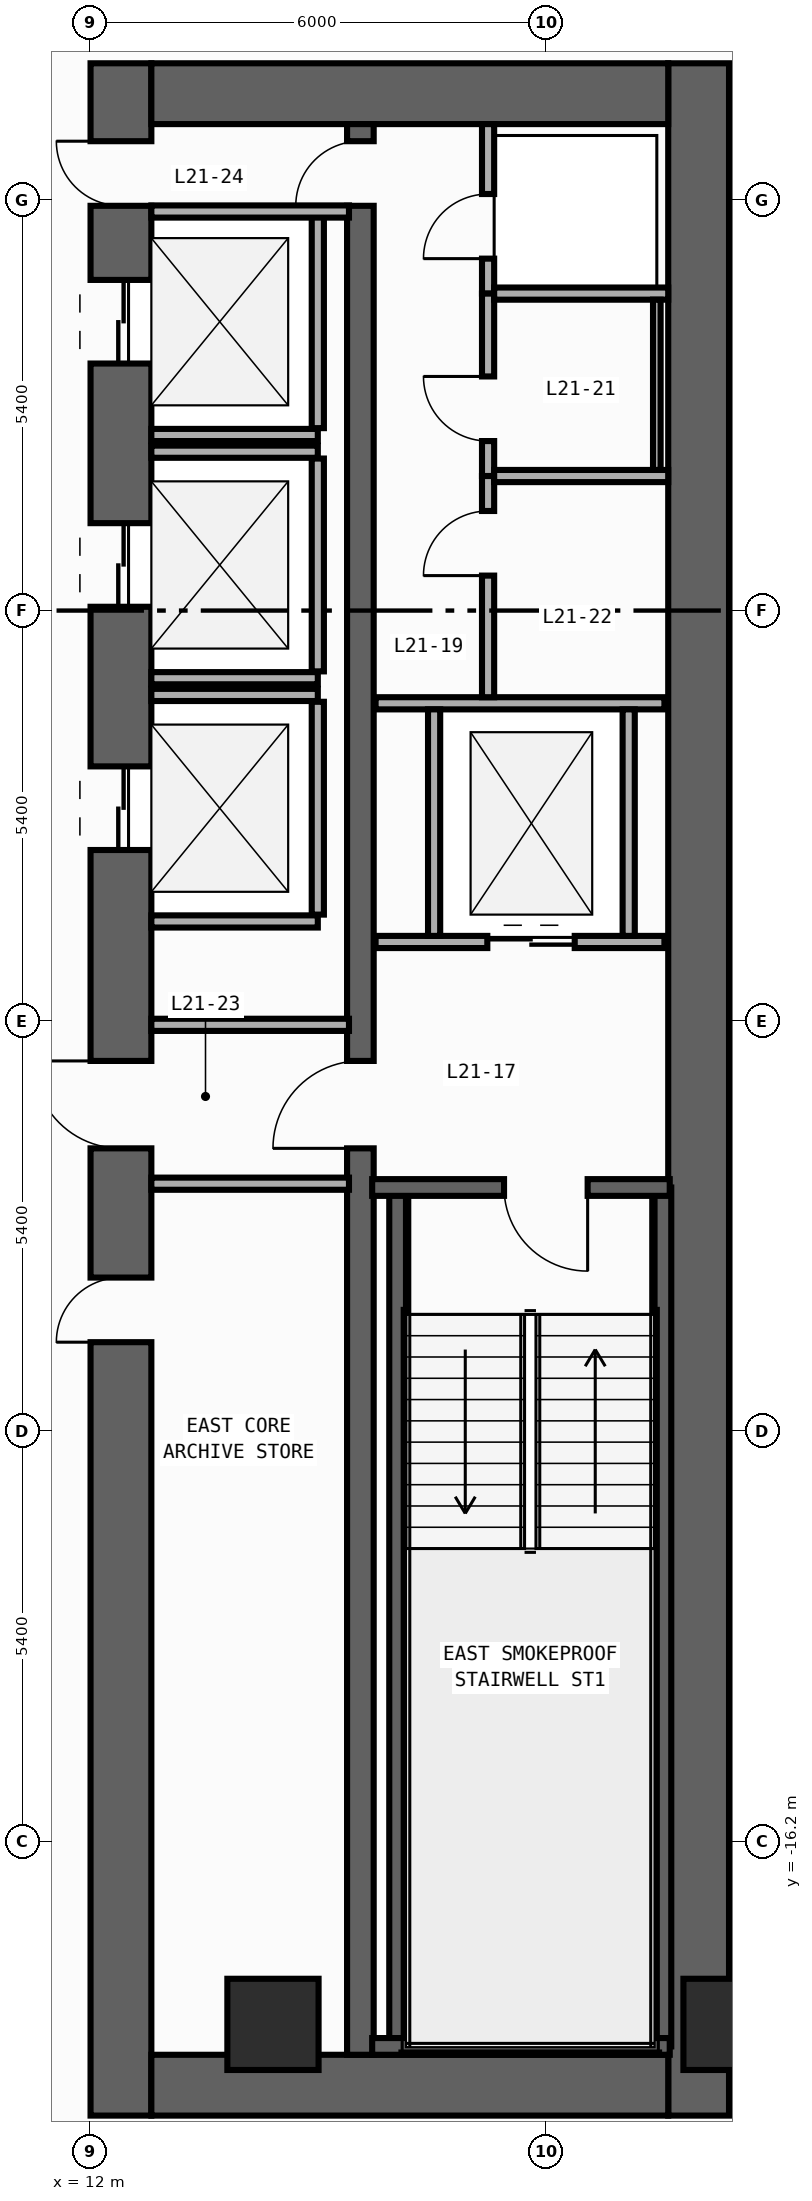
"""IFC4 building model, lengths in metres.
Left out: names, types, materials, properties, quantities, classifications, styles, units other than length and angle.
Written with IfcOpenShell. Run it as: python <this file> out.ifc"""

import sys

from ifc_helpers import new_model, si_unit, direction, frame, frame_2d, origin, origin_2d, place, context, subcontext, project, spatial, rectangle, extrude, element, fill, save


model = new_model("IFC4")
c1 = context("Model", 3, precision=1e-05, world=origin(), true_north=direction((0.0, 1.0)))
c2 = subcontext(c1, "Body", "Model", "MODEL_VIEW")
j1 = project(units=[si_unit("LENGTHUNIT", "METRE"), si_unit("PLANEANGLEUNIT", "RADIAN")], contexts=[c1])
p1 = place(None, origin())
s1 = spatial("IfcSite", under=j1, at=p1, CompositionType="ELEMENT")
p2 = place(p1, origin())
s2 = spatial("IfcBuilding", under=s1, at=p2, CompositionType="ELEMENT")
p3 = place(p2, frame((0.0, 0.0, 93.2)))
s3 = spatial("IfcBuildingStorey", under=s2, at=p3, CompositionType="ELEMENT", Elevation=93.2)
p4 = place(p3, frame((12.4, -19.8, 0.0), z_axis=(0.0, 0.0, 1.0), x_axis=(0.0, 1.0, 0.0)))
e1 = element("IfcWall", 1, at=p4, inside=s3, PredefinedType="SHEAR", context=c2, shape_type="SweptSolid", body=[
    extrude(rectangle(XDim=27.0, YDim=0.8, at=frame_2d((13.5, 0.0))), origin(), (0.0, 0.0, 1.0), 3.94),
])
p5 = place(p4, frame((23.05, 0.0, 0.0)))
e2 = element("IfcOpeningElement", 2, at=p5, cuts=e1, PredefinedType="OPENING", context=c2, shape_type="SweptSolid", body=[
    extrude(rectangle(XDim=1.1, YDim=2.2, at=frame_2d((0.55, 1.1))), frame((0.0, 0.41, 0.0), z_axis=(0.0, -1.0, 0.0), x_axis=(1.0, 0.0, 0.0)), (0.0, 0.0, 1.0), 0.82),
])
p6 = place(p4, frame((19.85, 0.0, 0.0)))
e3 = element("IfcOpeningElement", 3, at=p6, cuts=e1, PredefinedType="OPENING", context=c2, shape_type="SweptSolid", body=[
    extrude(rectangle(XDim=1.1, YDim=2.2, at=frame_2d((0.55, 1.1))), frame((0.0, 0.41, 0.0), z_axis=(0.0, -1.0, 0.0), x_axis=(1.0, 0.0, 0.0)), (0.0, 0.0, 1.0), 0.82),
])
p7 = place(p4, frame((16.65, 0.0, 0.0)))
e4 = element("IfcOpeningElement", 4, at=p7, cuts=e1, PredefinedType="OPENING", context=c2, shape_type="SweptSolid", body=[
    extrude(rectangle(XDim=1.1, YDim=2.2, at=frame_2d((0.55, 1.1))), frame((0.0, 0.41, 0.0), z_axis=(0.0, -1.0, 0.0), x_axis=(1.0, 0.0, 0.0)), (0.0, 0.0, 1.0), 0.82),
])
p8 = place(p4, frame((10.175, 0.0, 0.0)))
e5 = element("IfcOpeningElement", 5, at=p8, cuts=e1, PredefinedType="OPENING", context=c2, shape_type="SweptSolid", body=[
    extrude(rectangle(XDim=0.85, YDim=2.1, at=frame_2d((0.425, 1.05))), frame((0.0, 0.41, 0.0), z_axis=(0.0, -1.0, 0.0), x_axis=(1.0, 0.0, 0.0)), (0.0, 0.0, 1.0), 0.82),
])
p9 = place(p4, frame((12.725, 0.0, 0.0)))
e6 = element("IfcOpeningElement", 6, at=p9, cuts=e1, PredefinedType="OPENING", context=c2, shape_type="SweptSolid", body=[
    extrude(rectangle(XDim=1.15, YDim=2.2, at=frame_2d((0.575, 1.1))), frame((0.0, 0.41, 0.0), z_axis=(0.0, -1.0, 0.0), x_axis=(1.0, 0.0, 0.0)), (0.0, 0.0, 1.0), 0.82),
])
p10 = place(p4, frame((25.125, 0.0, 0.0)))
e7 = element("IfcOpeningElement", 7, at=p10, cuts=e1, PredefinedType="OPENING", context=c2, shape_type="SweptSolid", body=[
    extrude(rectangle(XDim=0.85, YDim=2.1, at=frame_2d((0.425, 1.05))), frame((0.0, 0.41, 0.0), z_axis=(0.0, -1.0, 0.0), x_axis=(1.0, 0.0, 0.0)), (0.0, 0.0, 1.0), 0.82),
])
p11 = place(p3, frame((20.0, -19.8, 0.0), z_axis=(0.0, 0.0, 1.0), x_axis=(0.0, 1.0, 0.0)))
e8 = element("IfcWall", 8, at=p11, inside=s3, PredefinedType="SHEAR", context=c2, shape_type="SweptSolid", body=[
    extrude(rectangle(XDim=27.0, YDim=0.8, at=frame_2d((13.5, 0.0))), origin(), (0.0, 0.0, 1.0), 3.94),
])
for number, where, z_axis, x_axis in (
    (9, (12.8, -19.4, 0.0), (0.0, 0.0, 1.0), (1.0, 0.0, 0.0)),
    (10, (12.8, 6.8, 0.0), (0.0, 0.0, 1.0), (1.0, 0.0, 0.0)),
):
    element("IfcWall", number, at=place(p3, frame(where, z_axis=z_axis, x_axis=x_axis)), inside=s3, PredefinedType="SHEAR", context=c2, shape_type="SweptSolid", body=[
        extrude(rectangle(XDim=6.8, YDim=0.8, at=frame_2d((3.4, 0.0))), origin(), (0.0, 0.0, 1.0), 3.94),
    ])
p12 = place(p3, frame((15.55, -19.0, 0.0), z_axis=(0.0, 0.0, 1.0), x_axis=(0.0, 1.0, 0.0)))
e11 = element("IfcWall", 11, at=p12, inside=s3, PredefinedType="SHEAR", context=c2, shape_type="SweptSolid", body=[
    extrude(rectangle(XDim=25.4, YDim=0.35, at=frame_2d((12.7, 0.0))), origin(), (0.0, 0.0, 1.0), 3.94),
])
p13 = place(p12, frame((11.925, 0.0, 0.0)))
e12 = element("IfcOpeningElement", 12, at=p13, cuts=e11, PredefinedType="OPENING", context=c2, shape_type="SweptSolid", body=[
    extrude(rectangle(XDim=1.15, YDim=2.2, at=frame_2d((0.575, 1.1))), frame((0.0, 0.185, 0.0), z_axis=(0.0, -1.0, 0.0), x_axis=(1.0, 0.0, 0.0)), (0.0, 0.0, 1.0), 0.37),
])
p14 = place(p12, frame((24.325, 0.0, 0.0)))
e13 = element("IfcOpeningElement", 13, at=p14, cuts=e11, PredefinedType="OPENING", context=c2, shape_type="SweptSolid", body=[
    extrude(rectangle(XDim=0.85, YDim=2.1, at=frame_2d((0.425, 1.05))), frame((0.0, 0.185, 0.0), z_axis=(0.0, -1.0, 0.0), x_axis=(1.0, 0.0, 0.0)), (0.0, 0.0, 1.0), 0.37),
])
for number, where, z_axis, x_axis in (
    (14, (16.04, -18.89, 0.0), (0.0, 0.0, 1.0), (0.0, 1.0, 0.0)),
    (15, (19.53, -18.89, 0.0), (0.0, 0.0, 1.0), (0.0, 1.0, 0.0)),
):
    element("IfcWall", number, at=place(p3, frame(where, z_axis=z_axis, x_axis=x_axis)), inside=s3, PredefinedType="SHEAR", context=c2, shape_type="SweptSolid", body=[
        extrude(rectangle(XDim=11.3, YDim=0.22, at=frame_2d((5.65, 0.0))), origin(), (0.0, 0.0, 1.0), 3.94),
    ])
p15 = place(p3, frame((15.705, -18.89, 0.0), z_axis=(0.0, 0.0, 1.0), x_axis=(1.0, 0.0, 0.0)))
e16 = element("IfcWall", 16, at=p15, inside=s3, PredefinedType="SHEAR", context=c2, shape_type="SweptSolid", body=[
    extrude(rectangle(XDim=3.915, YDim=0.22, at=frame_2d((1.958, 0.0))), origin(), (0.0, 0.0, 1.0), 3.94),
])
p16 = place(p3, frame((19.62, -7.59, 0.0), z_axis=(0.0, 0.0, 1.0), x_axis=(-1.0, 0.0, 0.0)))
e17 = element("IfcWall", 17, at=p16, inside=s3, PredefinedType="SHEAR", context=c2, shape_type="SweptSolid", body=[
    extrude(rectangle(XDim=3.915, YDim=0.22, at=frame_2d((1.958, 0.0))), origin(), (0.0, 0.0, 1.0), 3.94),
])
p17 = place(p16, frame((1.08, 0.0, 0.0)))
e18 = element("IfcOpeningElement", 18, at=p17, cuts=e17, PredefinedType="OPENING", context=c2, shape_type="SweptSolid", body=[
    extrude(rectangle(XDim=1.1, YDim=2.2, at=frame_2d((0.55, 1.1))), frame((0.0, 0.12, 0.0), z_axis=(0.0, -1.0, 0.0), x_axis=(1.0, 0.0, 0.0)), (0.0, 0.0, 1.0), 0.24),
])
for number, where, z_axis, x_axis in (
    (19, (20.4, -18.6, 0.0), (0.0, 0.0, 1.0), (1.0, 0.0, 0.0)),
    (20, (14.4, -18.6, 0.0), (0.0, 0.0, 1.0), (1.0, 0.0, 0.0)),
):
    element("IfcColumn", number, at=place(p3, frame(where, z_axis=z_axis, x_axis=x_axis)), inside=s3, PredefinedType="COLUMN", context=c2, shape_type="SweptSolid", body=[
        extrude(rectangle(XDim=1.2, YDim=1.2, at=origin_2d()), origin(), (0.0, 0.0, 1.0), 4.2),
    ])
p18 = place(p3, frame((12.8, 2.31, 0.0), z_axis=(0.0, 0.0, 1.0), x_axis=(1.0, 0.0, 0.0)))
e21 = element("IfcWall", 21, at=p18, inside=s3, PredefinedType="STANDARD", context=c2, shape_type="SweptSolid", body=[
    extrude(rectangle(XDim=2.19, YDim=0.16, at=frame_2d((1.095, 0.0))), origin(), (0.0, 0.0, 1.0), 3.94),
])
p19 = place(p3, frame((14.99, 2.4, 0.0), z_axis=(0.0, 0.0, 1.0), x_axis=(0.0, 1.0, 0.0)))
e22 = element("IfcWall", 22, at=p19, inside=s3, PredefinedType="STANDARD", context=c2, shape_type="SweptSolid", body=[
    extrude(rectangle(XDim=2.8, YDim=0.16, at=frame_2d((1.4, 0.0))), origin(), (0.0, 0.0, 1.0), 3.94),
])
for number, where, z_axis, x_axis in (
    (23, (12.8, -0.89, 0.0), (0.0, 0.0, 1.0), (1.0, 0.0, 0.0)),
    (24, (12.8, 2.09, 0.0), (0.0, 0.0, 1.0), (1.0, 0.0, 0.0)),
):
    element("IfcWall", number, at=place(p3, frame(where, z_axis=z_axis, x_axis=x_axis)), inside=s3, PredefinedType="STANDARD", context=c2, shape_type="SweptSolid", body=[
        extrude(rectangle(XDim=2.19, YDim=0.16, at=frame_2d((1.095, 0.0))), origin(), (0.0, 0.0, 1.0), 3.94),
    ])
p20 = place(p3, frame((14.99, -0.8, 0.0), z_axis=(0.0, 0.0, 1.0), x_axis=(0.0, 1.0, 0.0)))
e25 = element("IfcWall", 25, at=p20, inside=s3, PredefinedType="STANDARD", context=c2, shape_type="SweptSolid", body=[
    extrude(rectangle(XDim=2.8, YDim=0.16, at=frame_2d((1.4, 0.0))), origin(), (0.0, 0.0, 1.0), 3.94),
])
for number, where, z_axis, x_axis in (
    (26, (12.8, -4.09, 0.0), (0.0, 0.0, 1.0), (1.0, 0.0, 0.0)),
    (27, (12.8, -1.11, 0.0), (0.0, 0.0, 1.0), (1.0, 0.0, 0.0)),
):
    element("IfcWall", number, at=place(p3, frame(where, z_axis=z_axis, x_axis=x_axis)), inside=s3, PredefinedType="STANDARD", context=c2, shape_type="SweptSolid", body=[
        extrude(rectangle(XDim=2.19, YDim=0.16, at=frame_2d((1.095, 0.0))), origin(), (0.0, 0.0, 1.0), 3.94),
    ])
p21 = place(p3, frame((14.99, -4.0, 0.0), z_axis=(0.0, 0.0, 1.0), x_axis=(0.0, 1.0, 0.0)))
e28 = element("IfcWall", 28, at=p21, inside=s3, PredefinedType="STANDARD", context=c2, shape_type="SweptSolid", body=[
    extrude(rectangle(XDim=2.8, YDim=0.16, at=frame_2d((1.4, 0.0))), origin(), (0.0, 0.0, 1.0), 3.94),
])
p22 = place(p3, frame((15.75, -4.36, 0.0), z_axis=(0.0, 0.0, 1.0), x_axis=(1.0, 0.0, 0.0)))
e29 = element("IfcWall", 29, at=p22, inside=s3, PredefinedType="STANDARD", context=c2, shape_type="SweptSolid", body=[
    extrude(rectangle(XDim=3.8, YDim=0.16, at=frame_2d((1.9, 0.0))), origin(), (0.0, 0.0, 1.0), 3.94),
])
p23 = place(p22, frame((1.47, 0.0, 0.0)))
e30 = element("IfcOpeningElement", 30, at=p23, cuts=e29, PredefinedType="OPENING", context=c2, shape_type="SweptSolid", body=[
    extrude(rectangle(XDim=1.15, YDim=2.2, at=frame_2d((0.575, 1.1))), frame((0.0, 0.09, 0.0), z_axis=(0.0, -1.0, 0.0), x_axis=(1.0, 0.0, 0.0)), (0.0, 0.0, 1.0), 0.18),
])
p24 = place(p3, frame((15.75, -1.22, 0.0), z_axis=(0.0, 0.0, 1.0), x_axis=(1.0, 0.0, 0.0)))
e31 = element("IfcWall", 31, at=p24, inside=s3, PredefinedType="STANDARD", context=c2, shape_type="SweptSolid", body=[
    extrude(rectangle(XDim=3.8, YDim=0.16, at=frame_2d((1.9, 0.0))), origin(), (0.0, 0.0, 1.0), 3.94),
])
for number, where, z_axis, x_axis in (
    (32, (16.52, -4.28, 0.0), (0.0, 0.0, 1.0), (0.0, 1.0, 0.0)),
    (33, (19.08, -4.28, 0.0), (0.0, 0.0, 1.0), (0.0, 1.0, 0.0)),
):
    element("IfcWall", number, at=place(p3, frame(where, z_axis=z_axis, x_axis=x_axis)), inside=s3, PredefinedType="STANDARD", context=c2, shape_type="SweptSolid", body=[
        extrude(rectangle(XDim=2.98, YDim=0.16, at=frame_2d((1.49, 0.0))), origin(), (0.0, 0.0, 1.0), 3.94),
    ])
for number, where, z_axis, x_axis in (
    (34, (12.8, -5.45, 0.0), (0.0, 0.0, 1.0), (1.0, 0.0, 0.0)),
    (35, (12.8, -7.54, 0.0), (0.0, 0.0, 1.0), (1.0, 0.0, 0.0)),
    (36, (12.8, 5.25, 0.0), (0.0, 0.0, 1.0), (1.0, 0.0, 0.0)),
):
    element("IfcWall", number, at=place(p3, frame(where, z_axis=z_axis, x_axis=x_axis)), inside=s3, PredefinedType="STANDARD", context=c2, shape_type="SweptSolid", body=[
        extrude(rectangle(XDim=2.6, YDim=0.16, at=frame_2d((1.3, 0.0))), origin(), (0.0, 0.0, 1.0), 3.94),
    ])
p25 = place(p3, frame((17.23, 4.17, 0.0), z_axis=(0.0, 0.0, 1.0), x_axis=(0.0, 1.0, 0.0)))
e37 = element("IfcWall", 37, at=p25, inside=s3, PredefinedType="PARTITIONING", context=c2, shape_type="SweptSolid", body=[
    extrude(rectangle(XDim=2.23, YDim=0.16, at=frame_2d((1.115, 0.0))), origin(), (0.0, 0.0, 1.0), 3.94),
])
p26 = place(p25, frame((0.46, 0.0, 0.0)))
e38 = element("IfcOpeningElement", 38, at=p26, cuts=e37, PredefinedType="OPENING", context=c2, shape_type="SweptSolid", body=[
    extrude(rectangle(XDim=0.85, YDim=2.1, at=frame_2d((0.425, 1.05))), frame((0.0, 0.09, 0.0), z_axis=(0.0, -1.0, 0.0), x_axis=(1.0, 0.0, 0.0)), (0.0, 0.0, 1.0), 0.18),
])
p27 = place(p3, frame((17.23, 1.77, 0.0), z_axis=(0.0, 0.0, 1.0), x_axis=(0.0, 1.0, 0.0)))
e39 = element("IfcWall", 39, at=p27, inside=s3, PredefinedType="PARTITIONING", context=c2, shape_type="SweptSolid", body=[
    extrude(rectangle(XDim=2.4, YDim=0.16, at=frame_2d((1.2, 0.0))), origin(), (0.0, 0.0, 1.0), 3.94),
])
p28 = place(p27, frame((0.46, 0.0, 0.0)))
e40 = element("IfcOpeningElement", 40, at=p28, cuts=e39, PredefinedType="OPENING", context=c2, shape_type="SweptSolid", body=[
    extrude(rectangle(XDim=0.85, YDim=2.1, at=frame_2d((0.425, 1.05))), frame((0.0, 0.09, 0.0), z_axis=(0.0, -1.0, 0.0), x_axis=(1.0, 0.0, 0.0)), (0.0, 0.0, 1.0), 0.18),
])
p29 = place(p3, frame((17.23, -1.14, 0.0), z_axis=(0.0, 0.0, 1.0), x_axis=(0.0, 1.0, 0.0)))
e41 = element("IfcWall", 41, at=p29, inside=s3, PredefinedType="PARTITIONING", context=c2, shape_type="SweptSolid", body=[
    extrude(rectangle(XDim=2.91, YDim=0.16, at=frame_2d((1.455, 0.0))), origin(), (0.0, 0.0, 1.0), 3.94),
])
p30 = place(p29, frame((1.6, 0.0, 0.0)))
e42 = element("IfcOpeningElement", 42, at=p30, cuts=e41, PredefinedType="OPENING", context=c2, shape_type="SweptSolid", body=[
    extrude(rectangle(XDim=0.85, YDim=2.1, at=frame_2d((0.425, 1.05))), frame((0.0, 0.09, 0.0), z_axis=(0.0, -1.0, 0.0), x_axis=(1.0, 0.0, 0.0)), (0.0, 0.0, 1.0), 0.18),
])
for number, where, z_axis, x_axis in (
    (43, (17.31, 4.17, 0.0), (0.0, 0.0, 1.0), (1.0, 0.0, 0.0)),
    (44, (17.31, 1.77, 0.0), (0.0, 0.0, 1.0), (1.0, 0.0, 0.0)),
):
    element("IfcWall", number, at=place(p3, frame(where, z_axis=z_axis, x_axis=x_axis)), inside=s3, PredefinedType="PARTITIONING", context=c2, shape_type="SweptSolid", body=[
        extrude(rectangle(XDim=2.29, YDim=0.16, at=frame_2d((1.145, 0.0))), origin(), (0.0, 0.0, 1.0), 3.94),
    ])
p31 = place(p3, frame((19.45, 4.09, 0.0), z_axis=(0.0, 0.0, 1.0), x_axis=(0.0, -1.0, 0.0)))
e45 = element("IfcWall", 45, at=p31, inside=s3, PredefinedType="PARTITIONING", context=c2, shape_type="SweptSolid", body=[
    extrude(rectangle(XDim=2.24, YDim=0.1, at=frame_2d((1.12, 0.0))), origin(), (0.0, 0.0, 1.0), 3.94),
])
p32 = place(p17, origin())
e46 = element("IfcDoor", 46, at=p32, inside=s3, OperationType="SINGLE_SWING_LEFT", PredefinedType="DOOR", context=c2, shape_type="SweptSolid", body=[
    extrude(rectangle(XDim=1.1, YDim=2.2, at=frame_2d((0.55, 1.1))), frame((0.0, 0.025, 0.0), z_axis=(0.0, -1.0, 0.0), x_axis=(1.0, 0.0, 0.0)), (0.0, 0.0, 1.0), 0.05),
])
fill(e18, e46)
p33 = place(p5, origin())
e47 = element("IfcDoor", 47, at=p33, inside=s3, OperationType="DOUBLE_DOOR_SLIDING", PredefinedType="DOOR", context=c2, shape_type="SweptSolid", body=[
    extrude(rectangle(XDim=1.1, YDim=2.2, at=frame_2d((0.55, 1.1))), frame((0.0, 0.025, 0.0), z_axis=(0.0, -1.0, 0.0), x_axis=(1.0, 0.0, 0.0)), (0.0, 0.0, 1.0), 0.05),
])
fill(e2, e47)
p34 = place(p6, origin())
e48 = element("IfcDoor", 48, at=p34, inside=s3, OperationType="DOUBLE_DOOR_SLIDING", PredefinedType="DOOR", context=c2, shape_type="SweptSolid", body=[
    extrude(rectangle(XDim=1.1, YDim=2.2, at=frame_2d((0.55, 1.1))), frame((0.0, 0.025, 0.0), z_axis=(0.0, -1.0, 0.0), x_axis=(1.0, 0.0, 0.0)), (0.0, 0.0, 1.0), 0.05),
])
fill(e3, e48)
p35 = place(p7, origin())
e49 = element("IfcDoor", 49, at=p35, inside=s3, OperationType="DOUBLE_DOOR_SLIDING", PredefinedType="DOOR", context=c2, shape_type="SweptSolid", body=[
    extrude(rectangle(XDim=1.1, YDim=2.2, at=frame_2d((0.55, 1.1))), frame((0.0, 0.025, 0.0), z_axis=(0.0, -1.0, 0.0), x_axis=(1.0, 0.0, 0.0)), (0.0, 0.0, 1.0), 0.05),
])
fill(e4, e49)
p36 = place(p8, origin())
e50 = element("IfcDoor", 50, at=p36, inside=s3, OperationType="SINGLE_SWING_LEFT", PredefinedType="DOOR", context=c2, shape_type="SweptSolid", body=[
    extrude(rectangle(XDim=0.85, YDim=2.1, at=frame_2d((0.425, 1.05))), frame((0.0, 0.025, 0.0), z_axis=(0.0, -1.0, 0.0), x_axis=(1.0, 0.0, 0.0)), (0.0, 0.0, 1.0), 0.05),
])
fill(e5, e50)
p37 = place(p9, origin())
e51 = element("IfcDoor", 51, at=p37, inside=s3, OperationType="SINGLE_SWING_RIGHT", PredefinedType="DOOR", context=c2, shape_type="SweptSolid", body=[
    extrude(rectangle(XDim=1.15, YDim=2.2, at=frame_2d((0.575, 1.1))), frame((0.0, 0.025, 0.0), z_axis=(0.0, -1.0, 0.0), x_axis=(1.0, 0.0, 0.0)), (0.0, 0.0, 1.0), 0.05),
])
fill(e6, e51)
p38 = place(p13, origin())
e52 = element("IfcDoor", 52, at=p38, inside=s3, OperationType="SINGLE_SWING_LEFT", PredefinedType="DOOR", context=c2, shape_type="SweptSolid", body=[
    extrude(rectangle(XDim=1.15, YDim=2.2, at=frame_2d((0.575, 1.1))), frame((0.0, 0.025, 0.0), z_axis=(0.0, -1.0, 0.0), x_axis=(1.0, 0.0, 0.0)), (0.0, 0.0, 1.0), 0.05),
])
fill(e12, e52)
p39 = place(p10, origin())
e53 = element("IfcDoor", 53, at=p39, inside=s3, OperationType="SINGLE_SWING_RIGHT", PredefinedType="DOOR", context=c2, shape_type="SweptSolid", body=[
    extrude(rectangle(XDim=0.85, YDim=2.1, at=frame_2d((0.425, 1.05))), frame((0.0, 0.025, 0.0), z_axis=(0.0, -1.0, 0.0), x_axis=(1.0, 0.0, 0.0)), (0.0, 0.0, 1.0), 0.05),
])
fill(e7, e53)
p40 = place(p14, origin())
e54 = element("IfcDoor", 54, at=p40, inside=s3, OperationType="SINGLE_SWING_LEFT", PredefinedType="DOOR", context=c2, shape_type="SweptSolid", body=[
    extrude(rectangle(XDim=0.85, YDim=2.1, at=frame_2d((0.425, 1.05))), frame((0.0, 0.025, 0.0), z_axis=(0.0, -1.0, 0.0), x_axis=(1.0, 0.0, 0.0)), (0.0, 0.0, 1.0), 0.05),
])
fill(e13, e54)
p41 = place(p23, origin())
e55 = element("IfcDoor", 55, at=p41, inside=s3, OperationType="DOUBLE_DOOR_SLIDING", PredefinedType="DOOR", context=c2, shape_type="SweptSolid", body=[
    extrude(rectangle(XDim=1.15, YDim=2.2, at=frame_2d((0.575, 1.1))), frame((0.0, 0.025, 0.0), z_axis=(0.0, -1.0, 0.0), x_axis=(1.0, 0.0, 0.0)), (0.0, 0.0, 1.0), 0.05),
])
fill(e30, e55)
p42 = place(p26, origin())
e56 = element("IfcDoor", 56, at=p42, inside=s3, OperationType="SINGLE_SWING_LEFT", PredefinedType="DOOR", context=c2, shape_type="SweptSolid", body=[
    extrude(rectangle(XDim=0.85, YDim=2.1, at=frame_2d((0.425, 1.05))), frame((0.0, 0.025, 0.0), z_axis=(0.0, -1.0, 0.0), x_axis=(1.0, 0.0, 0.0)), (0.0, 0.0, 1.0), 0.05),
])
fill(e38, e56)
p43 = place(p28, origin())
e57 = element("IfcDoor", 57, at=p43, inside=s3, OperationType="SINGLE_SWING_RIGHT", PredefinedType="DOOR", context=c2, shape_type="SweptSolid", body=[
    extrude(rectangle(XDim=0.85, YDim=2.1, at=frame_2d((0.425, 1.05))), frame((0.0, 0.025, 0.0), z_axis=(0.0, -1.0, 0.0), x_axis=(1.0, 0.0, 0.0)), (0.0, 0.0, 1.0), 0.05),
])
fill(e40, e57)
p44 = place(p30, origin())
e58 = element("IfcDoor", 58, at=p44, inside=s3, OperationType="SINGLE_SWING_LEFT", PredefinedType="DOOR", context=c2, shape_type="SweptSolid", body=[
    extrude(rectangle(XDim=0.85, YDim=2.1, at=frame_2d((0.425, 1.05))), frame((0.0, 0.025, 0.0), z_axis=(0.0, -1.0, 0.0), x_axis=(1.0, 0.0, 0.0)), (0.0, 0.0, 1.0), 0.05),
])
fill(e42, e58)
save(model, sys.argv[1])
